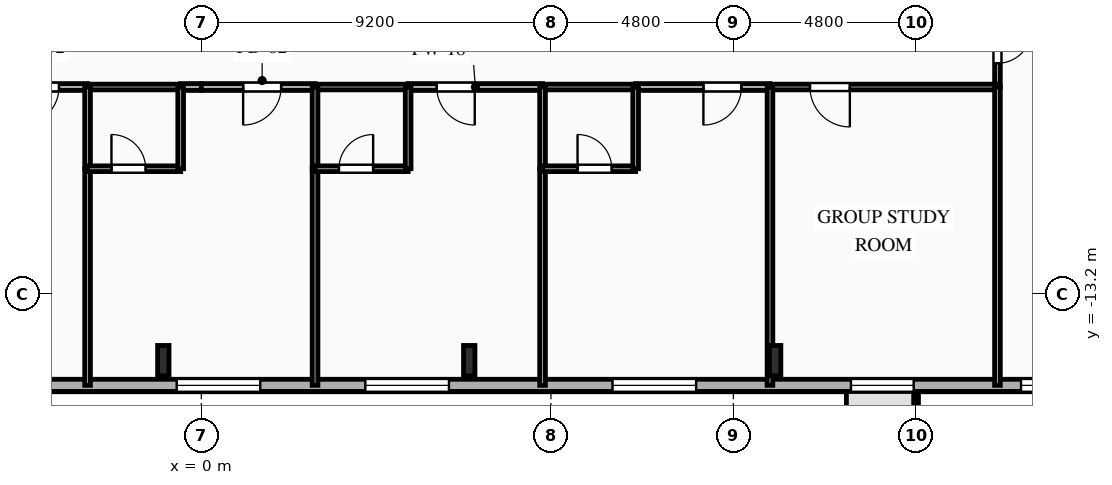
"""IFC4 building model, lengths in metres.
Left out: names, types, materials, properties, quantities, classifications, styles, units other than length and angle.
Written with IfcOpenShell. Run it as: python <this file> out.ifc"""

import sys

from ifc_helpers import new_model, si_unit, direction, frame, frame_2d, origin, origin_2d, place, context, subcontext, project, spatial, rectangle, i_section, extrude, element, fill, save


model = new_model("IFC4")
c1 = context("Model", 3, precision=1e-05, world=origin(), true_north=direction((0.0, 1.0)))
c2 = subcontext(c1, "Body", "Model", "MODEL_VIEW")
j1 = project(units=[si_unit("LENGTHUNIT", "METRE"), si_unit("PLANEANGLEUNIT", "RADIAN")], contexts=[c1])
p1 = place(None, origin())
s1 = spatial("IfcSite", under=j1, at=p1, CompositionType="ELEMENT")
p2 = place(p1, origin())
s2 = spatial("IfcBuilding", under=s1, at=p2, CompositionType="ELEMENT")
p3 = place(p2, frame((0.0, 0.0, 151.1)))
s3 = spatial("IfcBuildingStorey", under=s2, at=p3, CompositionType="ELEMENT", Elevation=151.1)
for number, where, z_axis, x_axis in (
    (1, (-1.0, -14.95, 0.0), (0.0, 0.0, 1.0), (1.0, 0.0, 0.0)),
    (2, (7.05, -14.95, 0.0), (0.0, 0.0, 1.0), (1.0, 0.0, 0.0)),
    (3, (15.1, -14.95, 0.0), (0.0, 0.0, 1.0), (1.0, 0.0, 0.0)),
):
    element("IfcColumn", number, at=place(p3, frame(where, z_axis=z_axis, x_axis=x_axis)), inside=s3, PredefinedType="COLUMN", context=c2, shape_type="SweptSolid", body=[
        extrude(i_section(OverallWidth=0.3, OverallDepth=0.8, WebThickness=0.018, FlangeThickness=0.033, FilletRadius=0.03, at=origin_2d()), origin(), (0.0, 0.0, 1.0), 3.35),
    ])
p4 = place(p3, frame((23.8, -15.6, 0.0), z_axis=(0.0, 0.0, 1.0), x_axis=(-1.0, 0.0, 0.0)))
e4 = element("IfcWall", 4, at=p4, inside=s3, PredefinedType="SOLIDWALL", context=c2, shape_type="SweptSolid", body=[
    extrude(rectangle(XDim=49.6, YDim=0.32, at=frame_2d((24.8, 0.0))), origin(), (0.0, 0.0, 1.0), 3.04),
])
p5 = place(p4, frame((1.13, 0.0, 0.85)))
e5 = element("IfcOpeningElement", 5, at=p5, cuts=e4, PredefinedType="OPENING", context=c2, shape_type="SweptSolid", body=[
    extrude(rectangle(XDim=1.1, YDim=1.85, at=frame_2d((0.55, 0.925))), frame((0.0, 0.17, 0.0), z_axis=(0.0, -1.0, 0.0), x_axis=(1.0, 0.0, 0.0)), (0.0, 0.0, 1.0), 0.34),
])
p6 = place(p4, frame((5.055, 0.0, 0.85)))
e6 = element("IfcOpeningElement", 6, at=p6, cuts=e4, PredefinedType="OPENING", context=c2, shape_type="SweptSolid", body=[
    extrude(rectangle(XDim=1.65, YDim=1.85, at=frame_2d((0.825, 0.925))), frame((0.0, 0.17, 0.0), z_axis=(0.0, -1.0, 0.0), x_axis=(1.0, 0.0, 0.0)), (0.0, 0.0, 1.0), 0.34),
])
p7 = place(p4, frame((10.78, 0.0, 0.85)))
e7 = element("IfcOpeningElement", 7, at=p7, cuts=e4, PredefinedType="OPENING", context=c2, shape_type="SweptSolid", body=[
    extrude(rectangle(XDim=2.2, YDim=1.85, at=frame_2d((1.1, 0.925))), frame((0.0, 0.17, 0.0), z_axis=(0.0, -1.0, 0.0), x_axis=(1.0, 0.0, 0.0)), (0.0, 0.0, 1.0), 0.34),
])
p8 = place(p4, frame((17.284, 0.0, 0.85)))
e8 = element("IfcOpeningElement", 8, at=p8, cuts=e4, PredefinedType="OPENING", context=c2, shape_type="SweptSolid", body=[
    extrude(rectangle(XDim=2.2, YDim=1.85, at=frame_2d((1.1, 0.925))), frame((0.0, 0.17, 0.0), z_axis=(0.0, -1.0, 0.0), x_axis=(1.0, 0.0, 0.0)), (0.0, 0.0, 1.0), 0.34),
])
p9 = place(p4, frame((22.248, 0.0, 0.85)))
e9 = element("IfcOpeningElement", 9, at=p9, cuts=e4, PredefinedType="OPENING", context=c2, shape_type="SweptSolid", body=[
    extrude(rectangle(XDim=2.2, YDim=1.85, at=frame_2d((1.1, 0.925))), frame((0.0, 0.17, 0.0), z_axis=(0.0, -1.0, 0.0), x_axis=(1.0, 0.0, 0.0)), (0.0, 0.0, 1.0), 0.34),
])
p10 = place(p4, frame((28.7, 0.0, 0.85)))
e10 = element("IfcOpeningElement", 10, at=p10, cuts=e4, PredefinedType="OPENING", context=c2, shape_type="SweptSolid", body=[
    extrude(rectangle(XDim=2.2, YDim=1.85, at=frame_2d((1.1, 0.925))), frame((0.0, 0.17, 0.0), z_axis=(0.0, -1.0, 0.0), x_axis=(1.0, 0.0, 0.0)), (0.0, 0.0, 1.0), 0.34),
])
p11 = place(p4, frame((34.7, 0.0, 0.85)))
e11 = element("IfcOpeningElement", 11, at=p11, cuts=e4, PredefinedType="OPENING", context=c2, shape_type="SweptSolid", body=[
    extrude(rectangle(XDim=2.2, YDim=1.85, at=frame_2d((1.1, 0.925))), frame((0.0, 0.17, 0.0), z_axis=(0.0, -1.0, 0.0), x_axis=(1.0, 0.0, 0.0)), (0.0, 0.0, 1.0), 0.34),
])
p12 = place(p4, frame((41.492, 0.0, 0.85)))
e12 = element("IfcOpeningElement", 12, at=p12, cuts=e4, PredefinedType="OPENING", context=c2, shape_type="SweptSolid", body=[
    extrude(rectangle(XDim=1.65, YDim=1.85, at=frame_2d((0.825, 0.925))), frame((0.0, 0.17, 0.0), z_axis=(0.0, -1.0, 0.0), x_axis=(1.0, 0.0, 0.0)), (0.0, 0.0, 1.0), 0.34),
])
p13 = place(p4, frame((46.175, 0.0, 0.85)))
e13 = element("IfcOpeningElement", 13, at=p13, cuts=e4, PredefinedType="OPENING", context=c2, shape_type="SweptSolid", body=[
    extrude(rectangle(XDim=1.65, YDim=1.85, at=frame_2d((0.825, 0.925))), frame((0.0, 0.17, 0.0), z_axis=(0.0, -1.0, 0.0), x_axis=(1.0, 0.0, 0.0)), (0.0, 0.0, 1.0), 0.34),
])
p14 = place(p3, frame((-2.993, -7.75, 0.0), z_axis=(0.0, 0.0, 1.0), x_axis=(-1.0, 0.0, 0.0)))
e14 = element("IfcWall", 14, at=p14, inside=s3, PredefinedType="PARTITIONING", context=c2, shape_type="SweptSolid", body=[
    extrude(rectangle(XDim=3.536, YDim=0.18, at=frame_2d((1.768, 0.0))), origin(), (0.0, 0.0, 1.0), 3.04),
])
p15 = place(p14, frame((0.752, 0.0, 0.0)))
e15 = element("IfcOpeningElement", 15, at=p15, cuts=e14, PredefinedType="OPENING", context=c2, shape_type="SweptSolid", body=[
    extrude(rectangle(XDim=1.0, YDim=2.15, at=frame_2d((0.5, 1.075))), frame((0.0, 0.1, 0.0), z_axis=(0.0, -1.0, 0.0), x_axis=(1.0, 0.0, 0.0)), (0.0, 0.0, 1.0), 0.2),
])
p16 = place(p3, frame((0.0, -7.75, 0.0), z_axis=(0.0, 0.0, 1.0), x_axis=(-1.0, 0.0, 0.0)))
e16 = element("IfcWall", 16, at=p16, inside=s3, PredefinedType="PARTITIONING", context=c2, shape_type="SweptSolid", body=[
    extrude(rectangle(XDim=0.543, YDim=0.18, at=frame_2d((0.271, 0.0))), origin(), (0.0, 0.0, 1.0), 3.04),
])
p17 = place(p3, frame((-0.543, -7.75, 0.0), z_axis=(0.0, 0.0, 1.0), x_axis=(-1.0, 0.0, 0.0)))
e17 = element("IfcWall", 17, at=p17, inside=s3, PredefinedType="PLUMBINGWALL", context=c2, shape_type="SweptSolid", body=[
    extrude(rectangle(XDim=2.45, YDim=0.15, at=frame_2d((1.225, 0.0))), origin(), (0.0, 0.0, 1.0), 3.04),
])
p18 = place(p3, frame((20.95, -5.6, 0.0), z_axis=(0.0, 0.0, 1.0), x_axis=(0.0, -1.0, 0.0)))
e18 = element("IfcWall", 18, at=p18, inside=s3, PredefinedType="PARTITIONING", context=c2, shape_type="SweptSolid", body=[
    extrude(rectangle(XDim=2.15, YDim=0.15, at=frame_2d((1.075, 0.0))), origin(), (0.0, 0.0, 1.0), 3.04),
])
p19 = place(p18, frame((0.625, 0.0, 0.0)))
e19 = element("IfcOpeningElement", 19, at=p19, cuts=e18, PredefinedType="OPENING", context=c2, shape_type="SweptSolid", body=[
    extrude(rectangle(XDim=0.9, YDim=2.1, at=frame_2d((0.45, 1.05))), frame((0.0, 0.085, 0.0), z_axis=(0.0, -1.0, 0.0), x_axis=(1.0, 0.0, 0.0)), (0.0, 0.0, 1.0), 0.17),
])
p20 = place(p3, frame((2.993, -7.75, 0.0), z_axis=(0.0, 0.0, 1.0), x_axis=(-1.0, 0.0, 0.0)))
e20 = element("IfcWall", 20, at=p20, inside=s3, PredefinedType="PARTITIONING", context=c2, shape_type="SweptSolid", body=[
    extrude(rectangle(XDim=2.993, YDim=0.18, at=frame_2d((1.497, 0.0))), origin(), (0.0, 0.0, 1.0), 3.04),
])
p21 = place(p20, frame((0.892, 0.0, 0.0)))
e21 = element("IfcOpeningElement", 21, at=p21, cuts=e20, PredefinedType="OPENING", context=c2, shape_type="SweptSolid", body=[
    extrude(rectangle(XDim=1.0, YDim=2.15, at=frame_2d((0.5, 1.075))), frame((0.0, 0.1, 0.0), z_axis=(0.0, -1.0, 0.0), x_axis=(1.0, 0.0, 0.0)), (0.0, 0.0, 1.0), 0.2),
])
p22 = place(p3, frame((8.979, -7.75, 0.0), z_axis=(0.0, 0.0, 1.0), x_axis=(-1.0, 0.0, 0.0)))
e22 = element("IfcWall", 22, at=p22, inside=s3, PredefinedType="PARTITIONING", context=c2, shape_type="SweptSolid", body=[
    extrude(rectangle(XDim=3.536, YDim=0.18, at=frame_2d((1.768, 0.0))), origin(), (0.0, 0.0, 1.0), 3.04),
])
p23 = place(p22, frame((1.784, 0.0, 0.0)))
e23 = element("IfcOpeningElement", 23, at=p23, cuts=e22, PredefinedType="OPENING", context=c2, shape_type="SweptSolid", body=[
    extrude(rectangle(XDim=1.0, YDim=2.15, at=frame_2d((0.5, 1.075))), frame((0.0, 0.1, 0.0), z_axis=(0.0, -1.0, 0.0), x_axis=(1.0, 0.0, 0.0)), (0.0, 0.0, 1.0), 0.2),
])
p24 = place(p3, frame((5.443, -7.75, 0.0), z_axis=(0.0, 0.0, 1.0), x_axis=(-1.0, 0.0, 0.0)))
e24 = element("IfcWall", 24, at=p24, inside=s3, PredefinedType="PLUMBINGWALL", context=c2, shape_type="SweptSolid", body=[
    extrude(rectangle(XDim=2.45, YDim=0.15, at=frame_2d((1.225, 0.0))), origin(), (0.0, 0.0, 1.0), 3.04),
])
p25 = place(p3, frame((14.964, -7.75, 0.0), z_axis=(0.0, 0.0, 1.0), x_axis=(-1.0, 0.0, 0.0)))
e25 = element("IfcWall", 25, at=p25, inside=s3, PredefinedType="PARTITIONING", context=c2, shape_type="SweptSolid", body=[
    extrude(rectangle(XDim=3.535, YDim=0.18, at=frame_2d((1.768, 0.0))), origin(), (0.0, 0.0, 1.0), 3.04),
])
p26 = place(p25, frame((0.752, 0.0, 0.0)))
e26 = element("IfcOpeningElement", 26, at=p26, cuts=e25, PredefinedType="OPENING", context=c2, shape_type="SweptSolid", body=[
    extrude(rectangle(XDim=1.0, YDim=2.15, at=frame_2d((0.5, 1.075))), frame((0.0, 0.1, 0.0), z_axis=(0.0, -1.0, 0.0), x_axis=(1.0, 0.0, 0.0)), (0.0, 0.0, 1.0), 0.2),
])
p27 = place(p3, frame((11.429, -7.75, 0.0), z_axis=(0.0, 0.0, 1.0), x_axis=(-1.0, 0.0, 0.0)))
e27 = element("IfcWall", 27, at=p27, inside=s3, PredefinedType="PLUMBINGWALL", context=c2, shape_type="SweptSolid", body=[
    extrude(rectangle(XDim=2.45, YDim=0.15, at=frame_2d((1.225, 0.0))), origin(), (0.0, 0.0, 1.0), 3.04),
])
p28 = place(p3, frame((20.95, -7.75, 0.0), z_axis=(0.0, 0.0, 1.0), x_axis=(-1.0, 0.0, 0.0)))
e28 = element("IfcWall", 28, at=p28, inside=s3, PredefinedType="PARTITIONING", context=c2, shape_type="SweptSolid", body=[
    extrude(rectangle(XDim=5.986, YDim=0.15, at=frame_2d((2.993, 0.0))), origin(), (0.0, 0.0, 1.0), 3.04),
])
p29 = place(p28, frame((3.884, 0.0, 0.0)))
e29 = element("IfcOpeningElement", 29, at=p29, cuts=e28, PredefinedType="OPENING", context=c2, shape_type="SweptSolid", body=[
    extrude(rectangle(XDim=1.05, YDim=2.15, at=frame_2d((0.525, 1.075))), frame((0.0, 0.085, 0.0), z_axis=(0.0, -1.0, 0.0), x_axis=(1.0, 0.0, 0.0)), (0.0, 0.0, 1.0), 0.17),
])
p30 = place(p3, frame((20.95, -15.6, 0.0), z_axis=(0.0, 0.0, 1.0), x_axis=(0.0, 1.0, 0.0)))
e30 = element("IfcWall", 30, at=p30, inside=s3, PredefinedType="PARTITIONING", context=c2, shape_type="SweptSolid", body=[
    extrude(rectangle(XDim=7.85, YDim=0.15, at=frame_2d((3.925, 0.0))), origin(), (0.0, 0.0, 1.0), 3.04),
])
p31 = place(p3, frame((-2.993, -9.9, 0.0), z_axis=(0.0, 0.0, 1.0), x_axis=(0.0, -1.0, 0.0)))
e31 = element("IfcWall", 31, at=p31, inside=s3, PredefinedType="PARTITIONING", context=c2, shape_type="SweptSolid", body=[
    extrude(rectangle(XDim=5.7, YDim=0.15, at=frame_2d((2.85, 0.0))), origin(), (0.0, 0.0, 1.0), 3.04),
])
p32 = place(p3, frame((-2.993, -7.75, 0.0), z_axis=(0.0, 0.0, 1.0), x_axis=(0.0, -1.0, 0.0)))
e32 = element("IfcWall", 32, at=p32, inside=s3, PredefinedType="PLUMBINGWALL", context=c2, shape_type="SweptSolid", body=[
    extrude(rectangle(XDim=2.15, YDim=0.15, at=frame_2d((1.075, 0.0))), origin(), (0.0, 0.0, 1.0), 3.04),
])
p33 = place(p3, frame((-2.993, -9.9, 0.0), z_axis=(0.0, 0.0, 1.0), x_axis=(1.0, 0.0, 0.0)))
e33 = element("IfcWall", 33, at=p33, inside=s3, PredefinedType="PLUMBINGWALL", context=c2, shape_type="SweptSolid", body=[
    extrude(rectangle(XDim=2.45, YDim=0.15, at=frame_2d((1.225, 0.0))), origin(), (0.0, 0.0, 1.0), 3.04),
])
p34 = place(p33, frame((0.629, 0.0, 0.0)))
e34 = element("IfcOpeningElement", 34, at=p34, cuts=e33, PredefinedType="OPENING", context=c2, shape_type="SweptSolid", body=[
    extrude(rectangle(XDim=0.9, YDim=2.1, at=frame_2d((0.45, 1.05))), frame((0.0, 0.085, 0.0), z_axis=(0.0, -1.0, 0.0), x_axis=(1.0, 0.0, 0.0)), (0.0, 0.0, 1.0), 0.17),
])
p35 = place(p3, frame((-0.543, -9.9, 0.0), z_axis=(0.0, 0.0, 1.0), x_axis=(0.0, 1.0, 0.0)))
e35 = element("IfcWall", 35, at=p35, inside=s3, PredefinedType="PLUMBINGWALL", context=c2, shape_type="SweptSolid", body=[
    extrude(rectangle(XDim=2.15, YDim=0.15, at=frame_2d((1.075, 0.0))), origin(), (0.0, 0.0, 1.0), 3.04),
])
p36 = place(p3, frame((2.993, -9.9, 0.0), z_axis=(0.0, 0.0, 1.0), x_axis=(0.0, -1.0, 0.0)))
e36 = element("IfcWall", 36, at=p36, inside=s3, PredefinedType="PARTITIONING", context=c2, shape_type="SweptSolid", body=[
    extrude(rectangle(XDim=5.7, YDim=0.15, at=frame_2d((2.85, 0.0))), origin(), (0.0, 0.0, 1.0), 3.04),
])
p37 = place(p3, frame((2.993, -7.75, 0.0), z_axis=(0.0, 0.0, 1.0), x_axis=(0.0, -1.0, 0.0)))
e37 = element("IfcWall", 37, at=p37, inside=s3, PredefinedType="PLUMBINGWALL", context=c2, shape_type="SweptSolid", body=[
    extrude(rectangle(XDim=2.15, YDim=0.15, at=frame_2d((1.075, 0.0))), origin(), (0.0, 0.0, 1.0), 3.04),
])
p38 = place(p3, frame((2.993, -9.9, 0.0), z_axis=(0.0, 0.0, 1.0), x_axis=(1.0, 0.0, 0.0)))
e38 = element("IfcWall", 38, at=p38, inside=s3, PredefinedType="PLUMBINGWALL", context=c2, shape_type="SweptSolid", body=[
    extrude(rectangle(XDim=2.45, YDim=0.15, at=frame_2d((1.225, 0.0))), origin(), (0.0, 0.0, 1.0), 3.04),
])
p39 = place(p38, frame((0.629, 0.0, 0.0)))
e39 = element("IfcOpeningElement", 39, at=p39, cuts=e38, PredefinedType="OPENING", context=c2, shape_type="SweptSolid", body=[
    extrude(rectangle(XDim=0.9, YDim=2.1, at=frame_2d((0.45, 1.05))), frame((0.0, 0.085, 0.0), z_axis=(0.0, -1.0, 0.0), x_axis=(1.0, 0.0, 0.0)), (0.0, 0.0, 1.0), 0.17),
])
p40 = place(p3, frame((5.443, -9.9, 0.0), z_axis=(0.0, 0.0, 1.0), x_axis=(0.0, 1.0, 0.0)))
e40 = element("IfcWall", 40, at=p40, inside=s3, PredefinedType="PLUMBINGWALL", context=c2, shape_type="SweptSolid", body=[
    extrude(rectangle(XDim=2.15, YDim=0.15, at=frame_2d((1.075, 0.0))), origin(), (0.0, 0.0, 1.0), 3.04),
])
p41 = place(p3, frame((8.979, -9.9, 0.0), z_axis=(0.0, 0.0, 1.0), x_axis=(0.0, -1.0, 0.0)))
e41 = element("IfcWall", 41, at=p41, inside=s3, PredefinedType="PARTITIONING", context=c2, shape_type="SweptSolid", body=[
    extrude(rectangle(XDim=5.7, YDim=0.15, at=frame_2d((2.85, 0.0))), origin(), (0.0, 0.0, 1.0), 3.04),
])
p42 = place(p3, frame((8.979, -7.75, 0.0), z_axis=(0.0, 0.0, 1.0), x_axis=(0.0, -1.0, 0.0)))
e42 = element("IfcWall", 42, at=p42, inside=s3, PredefinedType="PLUMBINGWALL", context=c2, shape_type="SweptSolid", body=[
    extrude(rectangle(XDim=2.15, YDim=0.15, at=frame_2d((1.075, 0.0))), origin(), (0.0, 0.0, 1.0), 3.04),
])
p43 = place(p3, frame((8.979, -9.9, 0.0), z_axis=(0.0, 0.0, 1.0), x_axis=(1.0, 0.0, 0.0)))
e43 = element("IfcWall", 43, at=p43, inside=s3, PredefinedType="PLUMBINGWALL", context=c2, shape_type="SweptSolid", body=[
    extrude(rectangle(XDim=2.45, YDim=0.15, at=frame_2d((1.225, 0.0))), origin(), (0.0, 0.0, 1.0), 3.04),
])
p44 = place(p43, frame((0.921, 0.0, 0.0)))
e44 = element("IfcOpeningElement", 44, at=p44, cuts=e43, PredefinedType="OPENING", context=c2, shape_type="SweptSolid", body=[
    extrude(rectangle(XDim=0.9, YDim=2.1, at=frame_2d((0.45, 1.05))), frame((0.0, 0.085, 0.0), z_axis=(0.0, -1.0, 0.0), x_axis=(1.0, 0.0, 0.0)), (0.0, 0.0, 1.0), 0.17),
])
p45 = place(p3, frame((11.429, -9.9, 0.0), z_axis=(0.0, 0.0, 1.0), x_axis=(0.0, 1.0, 0.0)))
e45 = element("IfcWall", 45, at=p45, inside=s3, PredefinedType="PLUMBINGWALL", context=c2, shape_type="SweptSolid", body=[
    extrude(rectangle(XDim=2.15, YDim=0.15, at=frame_2d((1.075, 0.0))), origin(), (0.0, 0.0, 1.0), 3.04),
])
p46 = place(p3, frame((14.964, -7.75, 0.0), z_axis=(0.0, 0.0, 1.0), x_axis=(0.0, -1.0, 0.0)))
e46 = element("IfcWall", 46, at=p46, inside=s3, PredefinedType="PARTITIONING", context=c2, shape_type="SweptSolid", body=[
    extrude(rectangle(XDim=7.85, YDim=0.15, at=frame_2d((3.925, 0.0))), origin(), (0.0, 0.0, 1.0), 3.04),
])
p47 = place(p5, origin())
e47 = element("IfcWindow", 47, at=p47, inside=s3, PartitioningType="SINGLE_PANEL", PredefinedType="WINDOW", context=c2, shape_type="SweptSolid", body=[
    extrude(rectangle(XDim=1.1, YDim=1.85, at=frame_2d((0.55, 0.925))), frame((0.0, 0.03, 0.0), z_axis=(0.0, -1.0, 0.0), x_axis=(1.0, 0.0, 0.0)), (0.0, 0.0, 1.0), 0.06),
])
fill(e5, e47)
p48 = place(p6, origin())
e48 = element("IfcWindow", 48, at=p48, inside=s3, PartitioningType="SINGLE_PANEL", PredefinedType="WINDOW", context=c2, shape_type="SweptSolid", body=[
    extrude(rectangle(XDim=1.65, YDim=1.85, at=frame_2d((0.825, 0.925))), frame((0.0, 0.03, 0.0), z_axis=(0.0, -1.0, 0.0), x_axis=(1.0, 0.0, 0.0)), (0.0, 0.0, 1.0), 0.06),
])
fill(e6, e48)
p49 = place(p7, origin())
e49 = element("IfcWindow", 49, at=p49, inside=s3, PartitioningType="SINGLE_PANEL", PredefinedType="WINDOW", context=c2, shape_type="SweptSolid", body=[
    extrude(rectangle(XDim=2.2, YDim=1.85, at=frame_2d((1.1, 0.925))), frame((0.0, 0.03, 0.0), z_axis=(0.0, -1.0, 0.0), x_axis=(1.0, 0.0, 0.0)), (0.0, 0.0, 1.0), 0.06),
])
fill(e7, e49)
p50 = place(p8, origin())
e50 = element("IfcWindow", 50, at=p50, inside=s3, PartitioningType="SINGLE_PANEL", PredefinedType="WINDOW", context=c2, shape_type="SweptSolid", body=[
    extrude(rectangle(XDim=2.2, YDim=1.85, at=frame_2d((1.1, 0.925))), frame((0.0, 0.03, 0.0), z_axis=(0.0, -1.0, 0.0), x_axis=(1.0, 0.0, 0.0)), (0.0, 0.0, 1.0), 0.06),
])
fill(e8, e50)
p51 = place(p9, origin())
e51 = element("IfcWindow", 51, at=p51, inside=s3, PartitioningType="SINGLE_PANEL", PredefinedType="WINDOW", context=c2, shape_type="SweptSolid", body=[
    extrude(rectangle(XDim=2.2, YDim=1.85, at=frame_2d((1.1, 0.925))), frame((0.0, 0.03, 0.0), z_axis=(0.0, -1.0, 0.0), x_axis=(1.0, 0.0, 0.0)), (0.0, 0.0, 1.0), 0.06),
])
fill(e9, e51)
p52 = place(p15, origin())
e52 = element("IfcDoor", 52, at=p52, inside=s3, OperationType="SINGLE_SWING_RIGHT", PredefinedType="DOOR", context=c2, shape_type="SweptSolid", body=[
    extrude(rectangle(XDim=1.0, YDim=2.15, at=frame_2d((0.5, 1.075))), frame((0.0, 0.025, 0.0), z_axis=(0.0, -1.0, 0.0), x_axis=(1.0, 0.0, 0.0)), (0.0, 0.0, 1.0), 0.05),
])
fill(e15, e52)
p53 = place(p19, origin())
e53 = element("IfcDoor", 53, at=p53, inside=s3, OperationType="SINGLE_SWING_LEFT", PredefinedType="DOOR", context=c2, shape_type="SweptSolid", body=[
    extrude(rectangle(XDim=0.9, YDim=2.1, at=frame_2d((0.45, 1.05))), frame((0.0, 0.025, 0.0), z_axis=(0.0, -1.0, 0.0), x_axis=(1.0, 0.0, 0.0)), (0.0, 0.0, 1.0), 0.05),
])
fill(e19, e53)
p54 = place(p21, origin())
e54 = element("IfcDoor", 54, at=p54, inside=s3, OperationType="SINGLE_SWING_RIGHT", PredefinedType="DOOR", context=c2, shape_type="SweptSolid", body=[
    extrude(rectangle(XDim=1.0, YDim=2.15, at=frame_2d((0.5, 1.075))), frame((0.0, 0.025, 0.0), z_axis=(0.0, -1.0, 0.0), x_axis=(1.0, 0.0, 0.0)), (0.0, 0.0, 1.0), 0.05),
])
fill(e21, e54)
p55 = place(p23, origin())
e55 = element("IfcDoor", 55, at=p55, inside=s3, OperationType="SINGLE_SWING_LEFT", PredefinedType="DOOR", context=c2, shape_type="SweptSolid", body=[
    extrude(rectangle(XDim=1.0, YDim=2.15, at=frame_2d((0.5, 1.075))), frame((0.0, 0.025, 0.0), z_axis=(0.0, -1.0, 0.0), x_axis=(1.0, 0.0, 0.0)), (0.0, 0.0, 1.0), 0.05),
])
fill(e23, e55)
p56 = place(p26, origin())
e56 = element("IfcDoor", 56, at=p56, inside=s3, OperationType="SINGLE_SWING_RIGHT", PredefinedType="DOOR", context=c2, shape_type="SweptSolid", body=[
    extrude(rectangle(XDim=1.0, YDim=2.15, at=frame_2d((0.5, 1.075))), frame((0.0, 0.025, 0.0), z_axis=(0.0, -1.0, 0.0), x_axis=(1.0, 0.0, 0.0)), (0.0, 0.0, 1.0), 0.05),
])
fill(e26, e56)
p57 = place(p29, origin())
e57 = element("IfcDoor", 57, at=p57, inside=s3, OperationType="SINGLE_SWING_LEFT", PredefinedType="DOOR", context=c2, shape_type="SweptSolid", body=[
    extrude(rectangle(XDim=1.05, YDim=2.15, at=frame_2d((0.525, 1.075))), frame((0.0, 0.025, 0.0), z_axis=(0.0, -1.0, 0.0), x_axis=(1.0, 0.0, 0.0)), (0.0, 0.0, 1.0), 0.05),
])
fill(e29, e57)
p58 = place(p34, origin())
e58 = element("IfcDoor", 58, at=p58, inside=s3, OperationType="SINGLE_SWING_LEFT", PredefinedType="DOOR", context=c2, shape_type="SweptSolid", body=[
    extrude(rectangle(XDim=0.9, YDim=2.1, at=frame_2d((0.45, 1.05))), frame((0.0, 0.025, 0.0), z_axis=(0.0, -1.0, 0.0), x_axis=(1.0, 0.0, 0.0)), (0.0, 0.0, 1.0), 0.05),
])
fill(e34, e58)
p59 = place(p39, origin())
e59 = element("IfcDoor", 59, at=p59, inside=s3, OperationType="SINGLE_SWING_RIGHT", PredefinedType="DOOR", context=c2, shape_type="SweptSolid", body=[
    extrude(rectangle(XDim=0.9, YDim=2.1, at=frame_2d((0.45, 1.05))), frame((0.0, 0.025, 0.0), z_axis=(0.0, -1.0, 0.0), x_axis=(1.0, 0.0, 0.0)), (0.0, 0.0, 1.0), 0.05),
])
fill(e39, e59)
p60 = place(p44, origin())
e60 = element("IfcDoor", 60, at=p60, inside=s3, OperationType="SINGLE_SWING_LEFT", PredefinedType="DOOR", context=c2, shape_type="SweptSolid", body=[
    extrude(rectangle(XDim=0.9, YDim=2.1, at=frame_2d((0.45, 1.05))), frame((0.0, 0.025, 0.0), z_axis=(0.0, -1.0, 0.0), x_axis=(1.0, 0.0, 0.0)), (0.0, 0.0, 1.0), 0.05),
])
fill(e44, e60)
save(model, sys.argv[1])
